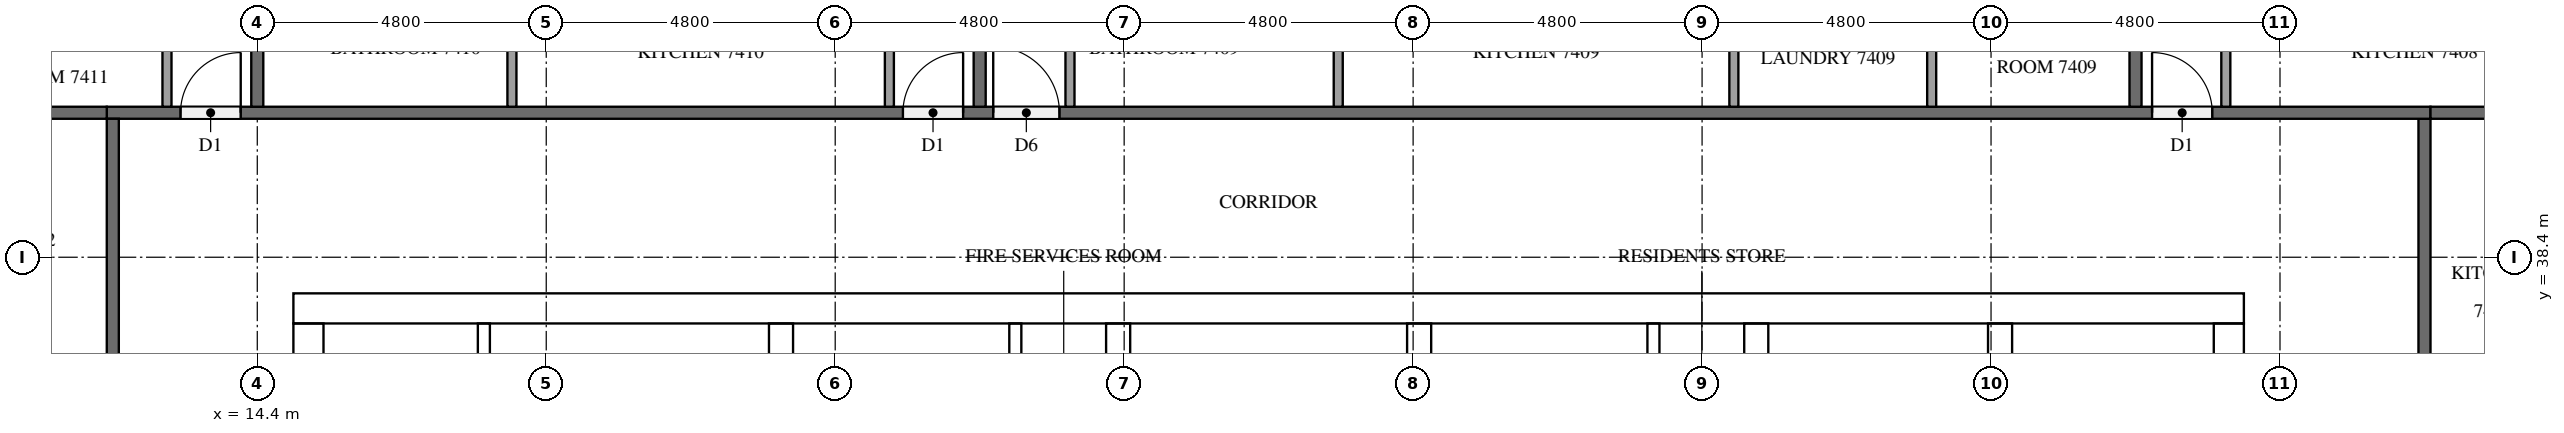
"""IFC4 building model, lengths in metres.
Left out: names, types, materials, properties, quantities, classifications, styles, units other than length and angle.
Written with IfcOpenShell. Run it as: python <this file> out.ifc"""

import sys

from ifc_helpers import new_model, si_unit, direction, frame, frame_2d, origin, place, context, subcontext, project, spatial, rectangle, extrude, element, fill, save


model = new_model("IFC4")
c1 = context("Model", 3, precision=1e-05, world=origin(), true_north=direction((0.0, 1.0)))
c2 = subcontext(c1, "Body", "Model", "MODEL_VIEW")
j1 = project(units=[si_unit("LENGTHUNIT", "METRE"), si_unit("PLANEANGLEUNIT", "RADIAN")], contexts=[c1])
p1 = place(None, origin())
s1 = spatial("IfcSite", under=j1, at=p1, CompositionType="ELEMENT")
p2 = place(p1, origin())
s2 = spatial("IfcBuilding", under=s1, at=p2, CompositionType="ELEMENT")
p3 = place(p2, frame((0.0, 0.0, 282.6)))
s3 = spatial("IfcBuildingStorey", under=s2, at=p3, CompositionType="ELEMENT", Elevation=282.6)
p4 = place(p3, frame((15.0, 37.55, 0.0), z_axis=(0.0, 0.0, 1.0), x_axis=(1.0, 0.0, 0.0)))
e1 = element("IfcWall", 1, at=p4, inside=s3, PredefinedType="SHEAR", context=c2, shape_type="SweptSolid", body=[
    extrude(rectangle(XDim=32.4, YDim=0.5, at=frame_2d((16.2, 0.0))), origin(), (0.0, 0.0, 1.0), 3.2),
])
p5 = place(p4, frame((15.3, 0.0, 0.0)))
e2 = element("IfcOpeningElement", 2, at=p5, cuts=e1, PredefinedType="OPENING", context=c2, shape_type="SweptSolid", body=[
    extrude(rectangle(XDim=1.8, YDim=2.1, at=frame_2d((0.9, 1.05))), frame((0.0, 0.26, 0.0), z_axis=(0.0, -1.0, 0.0), x_axis=(1.0, 0.0, 0.0)), (0.0, 0.0, 1.0), 0.52),
])
p6 = place(p4, frame((1.282, 0.0, 0.0)))
e3 = element("IfcOpeningElement", 3, at=p6, cuts=e1, PredefinedType="OPENING", context=c2, shape_type="SweptSolid", body=[
    extrude(rectangle(XDim=1.0, YDim=2.1, at=frame_2d((0.5, 1.05))), frame((0.0, 0.26, 0.0), z_axis=(0.0, -1.0, 0.0), x_axis=(1.0, 0.0, 0.0)), (0.0, 0.0, 1.0), 0.52),
])
p7 = place(p4, frame((5.082, 0.0, 0.0)))
e4 = element("IfcOpeningElement", 4, at=p7, cuts=e1, PredefinedType="OPENING", context=c2, shape_type="SweptSolid", body=[
    extrude(rectangle(XDim=1.0, YDim=2.1, at=frame_2d((0.5, 1.05))), frame((0.0, 0.26, 0.0), z_axis=(0.0, -1.0, 0.0), x_axis=(1.0, 0.0, 0.0)), (0.0, 0.0, 1.0), 0.52),
])
p8 = place(p3, frame((15.25, 15.5, 0.0), z_axis=(0.0, 0.0, 1.0), x_axis=(0.0, 1.0, 0.0)))
e5 = element("IfcWall", 5, at=p8, inside=s3, PredefinedType="SHEAR", context=c2, shape_type="SweptSolid", body=[
    extrude(rectangle(XDim=21.8, YDim=0.5, at=frame_2d((10.9, 0.0))), origin(), (0.0, 0.0, 1.0), 3.2),
])
p9 = place(p8, frame((5.26, 0.0, 0.0)))
e6 = element("IfcOpeningElement", 6, at=p9, cuts=e5, PredefinedType="OPENING", context=c2, shape_type="SweptSolid", body=[
    extrude(rectangle(XDim=1.2, YDim=2.1, at=frame_2d((0.6, 1.05))), frame((0.0, 0.26, 0.0), z_axis=(0.0, -1.0, 0.0), x_axis=(1.0, 0.0, 0.0)), (0.0, 0.0, 1.0), 0.52),
])
p10 = place(p3, frame((47.15, 15.5, 0.0), z_axis=(0.0, 0.0, 1.0), x_axis=(0.0, 1.0, 0.0)))
e7 = element("IfcWall", 7, at=p10, inside=s3, PredefinedType="SHEAR", context=c2, shape_type="SweptSolid", body=[
    extrude(rectangle(XDim=21.8, YDim=0.5, at=frame_2d((10.9, 0.0))), origin(), (0.0, 0.0, 1.0), 3.2),
])
p11 = place(p10, frame((10.6, 0.0, 0.0)))
e8 = element("IfcOpeningElement", 8, at=p11, cuts=e7, PredefinedType="OPENING", context=c2, shape_type="SweptSolid", body=[
    extrude(rectangle(XDim=1.2, YDim=2.1, at=frame_2d((0.6, 1.05))), frame((0.0, 0.26, 0.0), z_axis=(0.0, -1.0, 0.0), x_axis=(1.0, 0.0, 0.0)), (0.0, 0.0, 1.0), 0.52),
])
p12 = place(p3, frame((23.1, 15.5, 0.0), z_axis=(0.0, 0.0, 1.0), x_axis=(0.0, 1.0, 0.0)))
e9 = element("IfcWall", 9, at=p12, inside=s3, PredefinedType="SHEAR", context=c2, shape_type="SweptSolid", body=[
    extrude(rectangle(XDim=21.8, YDim=0.4, at=frame_2d((10.9, 0.0))), origin(), (0.0, 0.0, 1.0), 3.2),
])
p13 = place(p3, frame((39.3, 27.75, 0.0), z_axis=(0.0, 0.0, 1.0), x_axis=(0.0, 1.0, 0.0)))
e10 = element("IfcWall", 10, at=p13, inside=s3, PredefinedType="SHEAR", context=c2, shape_type="SweptSolid", body=[
    extrude(rectangle(XDim=9.55, YDim=0.4, at=frame_2d((4.775, 0.0))), origin(), (0.0, 0.0, 1.0), 3.2),
])
p14 = place(p3, frame((43.35, 27.75, 0.0), z_axis=(0.0, 0.0, 1.0), x_axis=(0.0, 1.0, 0.0)))
e11 = element("IfcWall", 11, at=p14, inside=s3, PredefinedType="SHEAR", context=c2, shape_type="SweptSolid", body=[
    extrude(rectangle(XDim=9.55, YDim=0.4, at=frame_2d((4.775, 0.0))), origin(), (0.0, 0.0, 1.0), 3.2),
])
p15 = place(p14, frame((7.65, 0.0, 0.0)))
e12 = element("IfcOpeningElement", 12, at=p15, cuts=e11, PredefinedType="OPENING", context=c2, shape_type="SweptSolid", body=[
    extrude(rectangle(XDim=1.2, YDim=2.1, at=frame_2d((0.6, 1.05))), frame((0.0, 0.21, 0.0), z_axis=(0.0, -1.0, 0.0), x_axis=(1.0, 0.0, 0.0)), (0.0, 0.0, 1.0), 0.42),
])
for number, where, z_axis, x_axis in (
    (13, (28.7, 33.75, 0.0), (0.0, 0.0, 1.0), (0.0, 1.0, 0.0)),
    (14, (33.7, 33.75, 0.0), (0.0, 0.0, 1.0), (0.0, 1.0, 0.0)),
):
    element("IfcWall", number, at=place(p3, frame(where, z_axis=z_axis, x_axis=x_axis)), inside=s3, PredefinedType="SHEAR", context=c2, shape_type="SweptSolid", body=[
        extrude(rectangle(XDim=3.55, YDim=0.4, at=frame_2d((1.775, 0.0))), origin(), (0.0, 0.0, 1.0), 3.2),
    ])
p16 = place(p3, frame((18.164, 31.45, 0.0), z_axis=(0.0, 0.0, 1.0), x_axis=(0.0, 1.0, 0.0)))
e15 = element("IfcWall", 15, at=p16, inside=s3, PredefinedType="PARTITIONING", context=c2, shape_type="SweptSolid", body=[
    extrude(rectangle(XDim=5.85, YDim=0.2, at=frame_2d((2.925, 0.0))), origin(), (0.0, 0.0, 1.0), 3.2),
])
for number, where, z_axis, x_axis in (
    (16, (26.992, 33.75, 0.0), (0.0, 0.0, 1.0), (0.0, 1.0, 0.0)),
    (17, (37.592, 33.75, 0.0), (0.0, 0.0, 1.0), (0.0, 1.0, 0.0)),
):
    element("IfcWall", number, at=place(p3, frame(where, z_axis=z_axis, x_axis=x_axis)), inside=s3, PredefinedType="PARTITIONING", context=c2, shape_type="SweptSolid", body=[
        extrude(rectangle(XDim=3.55, YDim=0.2, at=frame_2d((1.775, 0.0))), origin(), (0.0, 0.0, 1.0), 3.2),
    ])
p17 = place(p3, frame((50.4, 40.7, 0.0), z_axis=(0.0, 0.0, 1.0), x_axis=(0.0, -1.0, 0.0)))
e18 = element("IfcWall", 18, at=p17, inside=s3, PredefinedType="PARTITIONING", context=c2, shape_type="SweptSolid", body=[
    extrude(rectangle(XDim=28.6, YDim=0.2, at=frame_2d((14.3, 0.0))), origin(), (0.0, 0.0, 1.0), 3.2),
])
p18 = place(p17, frame((27.425, 0.0, 0.0)))
e19 = element("IfcOpeningElement", 19, at=p18, cuts=e18, PredefinedType="OPENING", context=c2, shape_type="SweptSolid", body=[
    extrude(rectangle(XDim=1.0, YDim=2.1, at=frame_2d((0.5, 1.05))), frame((0.0, 0.11, 0.0), z_axis=(0.0, -1.0, 0.0), x_axis=(1.0, 0.0, 0.0)), (0.0, 0.0, 1.0), 0.22),
])
p19 = place(p17, frame((13.025, 0.0, 0.0)))
e20 = element("IfcOpeningElement", 20, at=p19, cuts=e18, PredefinedType="OPENING", context=c2, shape_type="SweptSolid", body=[
    extrude(rectangle(XDim=1.0, YDim=2.1, at=frame_2d((0.5, 1.05))), frame((0.0, 0.11, 0.0), z_axis=(0.0, -1.0, 0.0), x_axis=(1.0, 0.0, 0.0)), (0.0, 0.0, 1.0), 0.22),
])
p20 = place(p3, frame((11.9, 40.8, 0.0), z_axis=(0.0, 0.0, 1.0), x_axis=(1.0, 0.0, 0.0)))
e21 = element("IfcWall", 21, at=p20, inside=s3, PredefinedType="PARTITIONING", context=c2, shape_type="SweptSolid", body=[
    extrude(rectangle(XDim=38.6, YDim=0.2, at=frame_2d((19.3, 0.0))), origin(), (0.0, 0.0, 1.0), 3.2),
])
p21 = place(p20, frame((33.975, 0.0, 0.0)))
e22 = element("IfcOpeningElement", 22, at=p21, cuts=e21, PredefinedType="OPENING", context=c2, shape_type="SweptSolid", body=[
    extrude(rectangle(XDim=1.0, YDim=2.1, at=frame_2d((0.5, 1.05))), frame((0.0, 0.11, 0.0), z_axis=(0.0, -1.0, 0.0), x_axis=(1.0, 0.0, 0.0)), (0.0, 0.0, 1.0), 0.22),
])
p22 = place(p20, frame((14.725, 0.0, 0.0)))
e23 = element("IfcOpeningElement", 23, at=p22, cuts=e21, PredefinedType="OPENING", context=c2, shape_type="SweptSolid", body=[
    extrude(rectangle(XDim=1.1, YDim=2.1, at=frame_2d((0.55, 1.05))), frame((0.0, 0.11, 0.0), z_axis=(0.0, -1.0, 0.0), x_axis=(1.0, 0.0, 0.0)), (0.0, 0.0, 1.0), 0.22),
])
p23 = place(p20, frame((13.225, 0.0, 0.0)))
e24 = element("IfcOpeningElement", 24, at=p23, cuts=e21, PredefinedType="OPENING", context=c2, shape_type="SweptSolid", body=[
    extrude(rectangle(XDim=1.0, YDim=2.1, at=frame_2d((0.5, 1.05))), frame((0.0, 0.11, 0.0), z_axis=(0.0, -1.0, 0.0), x_axis=(1.0, 0.0, 0.0)), (0.0, 0.0, 1.0), 0.22),
])
p24 = place(p20, frame((1.225, 0.0, 0.0)))
e25 = element("IfcOpeningElement", 25, at=p24, cuts=e21, PredefinedType="OPENING", context=c2, shape_type="SweptSolid", body=[
    extrude(rectangle(XDim=1.0, YDim=2.1, at=frame_2d((0.5, 1.05))), frame((0.0, 0.11, 0.0), z_axis=(0.0, -1.0, 0.0), x_axis=(1.0, 0.0, 0.0)), (0.0, 0.0, 1.0), 0.22),
])
p25 = place(p3, frame((12.0, 12.1, 0.0), z_axis=(0.0, 0.0, 1.0), x_axis=(0.0, 1.0, 0.0)))
e26 = element("IfcWall", 26, at=p25, inside=s3, PredefinedType="PARTITIONING", context=c2, shape_type="SweptSolid", body=[
    extrude(rectangle(XDim=28.6, YDim=0.2, at=frame_2d((14.3, 0.0))), origin(), (0.0, 0.0, 1.0), 3.2),
])
p26 = place(p25, frame((16.975, 0.0, 0.0)))
e27 = element("IfcOpeningElement", 27, at=p26, cuts=e26, PredefinedType="OPENING", context=c2, shape_type="SweptSolid", body=[
    extrude(rectangle(XDim=1.0, YDim=2.1, at=frame_2d((0.5, 1.05))), frame((0.0, 0.11, 0.0), z_axis=(0.0, -1.0, 0.0), x_axis=(1.0, 0.0, 0.0)), (0.0, 0.0, 1.0), 0.22),
])
p27 = place(p25, frame((0.175, 0.0, 0.0)))
e28 = element("IfcOpeningElement", 28, at=p27, cuts=e26, PredefinedType="OPENING", context=c2, shape_type="SweptSolid", body=[
    extrude(rectangle(XDim=1.0, YDim=2.1, at=frame_2d((0.5, 1.05))), frame((0.0, 0.11, 0.0), z_axis=(0.0, -1.0, 0.0), x_axis=(1.0, 0.0, 0.0)), (0.0, 0.0, 1.0), 0.22),
])
for number, where, z_axis, x_axis in (
    (29, (50.5, 40.8, 0.0), (0.0, 0.0, 1.0), (1.0, 0.0, 0.0)),
    (30, (45.6, 47.9, 0.0), (0.0, 0.0, 1.0), (0.0, -1.0, 0.0)),
    (31, (26.4, 47.9, 0.0), (0.0, 0.0, 1.0), (0.0, -1.0, 0.0)),
):
    element("IfcWall", number, at=place(p3, frame(where, z_axis=z_axis, x_axis=x_axis)), inside=s3, PredefinedType="PARTITIONING", context=c2, shape_type="SweptSolid", body=[
        extrude(rectangle(XDim=7.0, YDim=0.2, at=frame_2d((3.5, 0.0))), origin(), (0.0, 0.0, 1.0), 3.2),
    ])
p28 = place(p3, frame((14.4, 47.75, 0.0), z_axis=(0.0, 0.0, 1.0), x_axis=(0.0, -1.0, 0.0)))
e32 = element("IfcWall", 32, at=p28, inside=s3, PredefinedType="PARTITIONING", context=c2, shape_type="SweptSolid", body=[
    extrude(rectangle(XDim=6.85, YDim=0.2, at=frame_2d((3.425, 0.0))), origin(), (0.0, 0.0, 1.0), 3.2),
])
p29 = place(p3, frame((0.1, 40.8, 0.0), z_axis=(0.0, 0.0, 1.0), x_axis=(1.0, 0.0, 0.0)))
e33 = element("IfcWall", 33, at=p29, inside=s3, PredefinedType="PARTITIONING", context=c2, shape_type="SweptSolid", body=[
    extrude(rectangle(XDim=11.8, YDim=0.2, at=frame_2d((5.9, 0.0))), origin(), (0.0, 0.0, 1.0), 3.2),
])
p30 = place(p3, frame((47.1, 40.9, 0.0), z_axis=(0.0, 0.0, 1.0), x_axis=(0.0, 1.0, 0.0)))
e34 = element("IfcWall", 34, at=p30, inside=s3, PredefinedType="PARTITIONING", context=c2, shape_type="SweptSolid", body=[
    extrude(rectangle(XDim=1.925, YDim=0.15, at=frame_2d((0.962, 0.0))), origin(), (0.0, 0.0, 1.0), 3.2),
])
for number, where, z_axis, x_axis in (
    (35, (32.356, 40.9, 0.0), (0.0, 0.0, 1.0), (0.0, 1.0, 0.0)),
    (36, (38.928, 40.9, 0.0), (0.0, 0.0, 1.0), (0.0, 1.0, 0.0)),
    (37, (42.214, 40.9, 0.0), (0.0, 0.0, 1.0), (0.0, 1.0, 0.0)),
):
    element("IfcWall", number, at=place(p3, frame(where, z_axis=z_axis, x_axis=x_axis)), inside=s3, PredefinedType="PARTITIONING", context=c2, shape_type="SweptSolid", body=[
        extrude(rectangle(XDim=1.775, YDim=0.15, at=frame_2d((0.888, 0.0))), origin(), (0.0, 0.0, 1.0), 3.2),
    ])
p31 = place(p3, frame((27.9, 40.9, 0.0), z_axis=(0.0, 0.0, 1.0), x_axis=(0.0, 1.0, 0.0)))
e38 = element("IfcWall", 38, at=p31, inside=s3, PredefinedType="PARTITIONING", context=c2, shape_type="SweptSolid", body=[
    extrude(rectangle(XDim=1.925, YDim=0.15, at=frame_2d((0.962, 0.0))), origin(), (0.0, 0.0, 1.0), 3.2),
])
p32 = place(p3, frame((18.63, 40.9, 0.0), z_axis=(0.0, 0.0, 1.0), x_axis=(0.0, 1.0, 0.0)))
e39 = element("IfcWall", 39, at=p32, inside=s3, PredefinedType="PARTITIONING", context=c2, shape_type="SweptSolid", body=[
    extrude(rectangle(XDim=1.775, YDim=0.15, at=frame_2d((0.888, 0.0))), origin(), (0.0, 0.0, 1.0), 3.2),
])
p33 = place(p3, frame((24.9, 40.9, 0.0), z_axis=(0.0, 0.0, 1.0), x_axis=(0.0, 1.0, 0.0)))
e40 = element("IfcWall", 40, at=p33, inside=s3, PredefinedType="PARTITIONING", context=c2, shape_type="SweptSolid", body=[
    extrude(rectangle(XDim=1.925, YDim=0.15, at=frame_2d((0.962, 0.0))), origin(), (0.0, 0.0, 1.0), 3.2),
])
p34 = place(p3, frame((12.9, 40.9, 0.0), z_axis=(0.0, 0.0, 1.0), x_axis=(0.0, 1.0, 0.0)))
e41 = element("IfcWall", 41, at=p34, inside=s3, PredefinedType="PARTITIONING", context=c2, shape_type="SweptSolid", body=[
    extrude(rectangle(XDim=2.075, YDim=0.15, at=frame_2d((1.038, 0.0))), origin(), (0.0, 0.0, 1.0), 3.2),
])
p35 = place(p5, origin())
e42 = element("IfcDoor", 42, at=p35, inside=s3, OperationType="DOUBLE_DOOR_SINGLE_SWING", PredefinedType="DOOR", context=c2, shape_type="SweptSolid", body=[
    extrude(rectangle(XDim=1.8, YDim=2.1, at=frame_2d((0.9, 1.05))), frame((0.0, 0.025, 0.0), z_axis=(0.0, -1.0, 0.0), x_axis=(1.0, 0.0, 0.0)), (0.0, 0.0, 1.0), 0.05),
])
fill(e2, e42)
p36 = place(p6, origin())
e43 = element("IfcDoor", 43, at=p36, inside=s3, OperationType="SINGLE_SWING_LEFT", PredefinedType="DOOR", context=c2, shape_type="SweptSolid", body=[
    extrude(rectangle(XDim=1.0, YDim=2.1, at=frame_2d((0.5, 1.05))), frame((0.0, 0.025, 0.0), z_axis=(0.0, -1.0, 0.0), x_axis=(1.0, 0.0, 0.0)), (0.0, 0.0, 1.0), 0.05),
])
fill(e3, e43)
p37 = place(p7, origin())
e44 = element("IfcDoor", 44, at=p37, inside=s3, OperationType="SINGLE_SWING_RIGHT", PredefinedType="DOOR", context=c2, shape_type="SweptSolid", body=[
    extrude(rectangle(XDim=1.0, YDim=2.1, at=frame_2d((0.5, 1.05))), frame((0.0, 0.025, 0.0), z_axis=(0.0, -1.0, 0.0), x_axis=(1.0, 0.0, 0.0)), (0.0, 0.0, 1.0), 0.05),
])
fill(e4, e44)
p38 = place(p21, origin())
e45 = element("IfcDoor", 45, at=p38, inside=s3, OperationType="SINGLE_SWING_LEFT", PredefinedType="DOOR", context=c2, shape_type="SweptSolid", body=[
    extrude(rectangle(XDim=1.0, YDim=2.1, at=frame_2d((0.5, 1.05))), frame((0.0, 0.025, 0.0), z_axis=(0.0, -1.0, 0.0), x_axis=(1.0, 0.0, 0.0)), (0.0, 0.0, 1.0), 0.05),
])
fill(e22, e45)
p39 = place(p22, origin())
e46 = element("IfcDoor", 46, at=p39, inside=s3, OperationType="SINGLE_SWING_LEFT", PredefinedType="DOOR", context=c2, shape_type="SweptSolid", body=[
    extrude(rectangle(XDim=1.1, YDim=2.1, at=frame_2d((0.55, 1.05))), frame((0.0, 0.025, 0.0), z_axis=(0.0, -1.0, 0.0), x_axis=(1.0, 0.0, 0.0)), (0.0, 0.0, 1.0), 0.05),
])
fill(e23, e46)
p40 = place(p23, origin())
e47 = element("IfcDoor", 47, at=p40, inside=s3, OperationType="SINGLE_SWING_RIGHT", PredefinedType="DOOR", context=c2, shape_type="SweptSolid", body=[
    extrude(rectangle(XDim=1.0, YDim=2.1, at=frame_2d((0.5, 1.05))), frame((0.0, 0.025, 0.0), z_axis=(0.0, -1.0, 0.0), x_axis=(1.0, 0.0, 0.0)), (0.0, 0.0, 1.0), 0.05),
])
fill(e24, e47)
p41 = place(p24, origin())
e48 = element("IfcDoor", 48, at=p41, inside=s3, OperationType="SINGLE_SWING_RIGHT", PredefinedType="DOOR", context=c2, shape_type="SweptSolid", body=[
    extrude(rectangle(XDim=1.0, YDim=2.1, at=frame_2d((0.5, 1.05))), frame((0.0, 0.025, 0.0), z_axis=(0.0, -1.0, 0.0), x_axis=(1.0, 0.0, 0.0)), (0.0, 0.0, 1.0), 0.05),
])
fill(e25, e48)
save(model, sys.argv[1])
